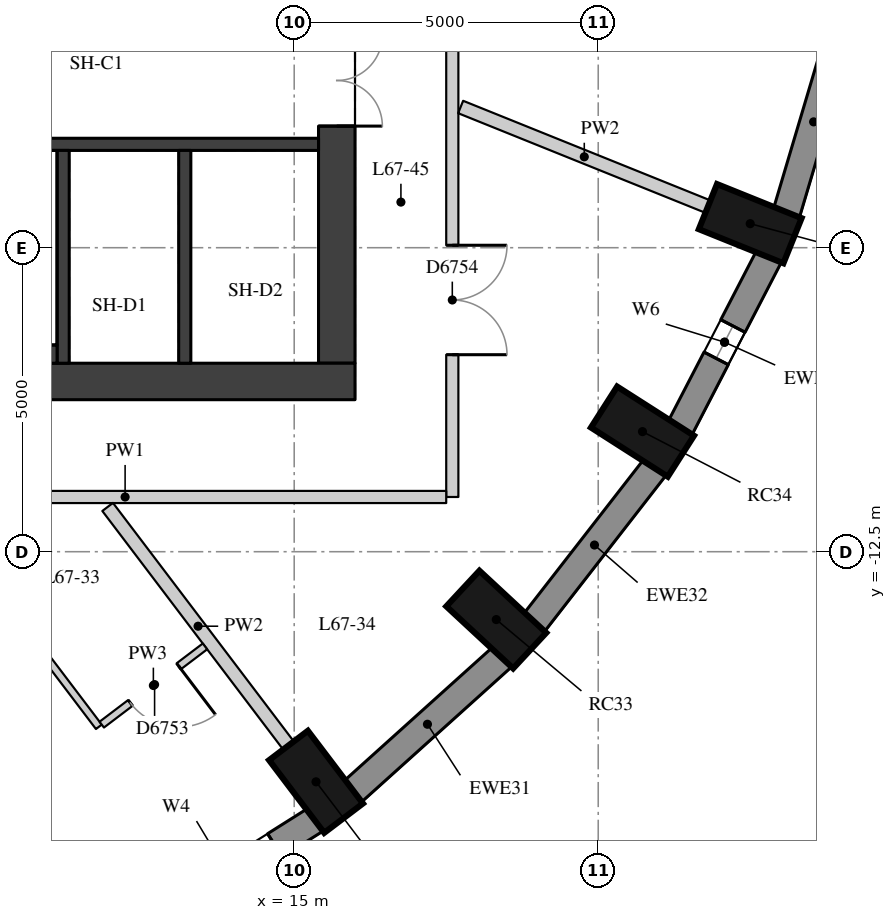
"""IFC4 building model, lengths in metres.
Left out: names, types, materials, properties, quantities, classifications, styles, units other than length and angle.
Written with IfcOpenShell. Run it as: python <this file> out.ifc"""

import sys

from ifc_helpers import new_model, si_unit, direction, frame, frame_2d, origin, origin_2d, place, context, subcontext, project, spatial, rectangle, extrude, element, fill, save


model = new_model("IFC4")
c1 = context("Model", 3, precision=1e-05, world=origin(), true_north=direction((0.0, 1.0)))
c2 = subcontext(c1, "Body", "Model", "MODEL_VIEW")
j1 = project(units=[si_unit("LENGTHUNIT", "METRE"), si_unit("PLANEANGLEUNIT", "RADIAN")], contexts=[c1])
p1 = place(None, origin())
s1 = spatial("IfcSite", under=j1, at=p1, CompositionType="ELEMENT")
p2 = place(p1, origin())
s2 = spatial("IfcBuilding", under=s1, at=p2, CompositionType="ELEMENT")
p3 = place(p2, frame((0.0, 0.0, 236.6)))
s3 = spatial("IfcBuildingStorey", under=s2, at=p3, CompositionType="ELEMENT", Elevation=236.6)
for number, where, z_axis, x_axis in (
    (1, (15.359, -16.285, 0.0), (0.0, 0.0, 1.0), (0.604, -0.797, 0.0)),
    (2, (18.323, -13.616, 0.0), (0.0, 0.0, 1.0), (0.733, -0.681, 0.0)),
    (3, (20.728, -10.525, 0.0), (0.0, 0.0, 1.0), (0.843, -0.539, 0.0)),
    (4, (22.5, -7.105, 0.0), (0.0, 0.0, 1.0), (0.928, -0.374, 0.0)),
):
    element("IfcColumn", number, at=place(p3, frame(where, z_axis=z_axis, x_axis=x_axis)), inside=s3, PredefinedType="COLUMN", context=c2, shape_type="SweptSolid", body=[
        extrude(rectangle(XDim=1.5, YDim=0.8, at=origin_2d()), origin(), (0.0, 0.0, 1.0), 3.3),
    ])
p4 = place(p3, frame((12.49, -18.711, 0.0), z_axis=(0.0, 0.0, 1.0), x_axis=(0.845929139811, 0.53329531258, 0.0)))
e5 = element("IfcWall", 5, at=p4, inside=s3, PredefinedType="SOLIDWALL", context=c2, shape_type="SweptSolid", body=[
    extrude(rectangle(XDim=3.385, YDim=0.45, at=frame_2d((1.692, 0.0))), origin(), (0.0, 0.0, 1.0), 3.02),
])
p5 = place(p4, frame((0.792, 0.0, 0.4)))
e6 = element("IfcOpeningElement", 6, at=p5, cuts=e5, PredefinedType="OPENING", context=c2, shape_type="SweptSolid", body=[
    extrude(rectangle(XDim=1.8, YDim=1.75, at=frame_2d((0.9, 0.875))), frame((0.0, 0.235, 0.0), z_axis=(0.0, -1.0, 0.0), x_axis=(1.0, 0.0, 0.0)), (0.0, 0.0, 1.0), 0.47),
])
p6 = place(p3, frame((15.959, -16.448, 0.0), z_axis=(0.0, 0.0, 1.0), x_axis=(0.743166014219, 0.669107073128, 0.0)))
e7 = element("IfcWall", 7, at=p6, inside=s3, PredefinedType="SOLIDWALL", context=c2, shape_type="SweptSolid", body=[
    extrude(rectangle(XDim=3.316, YDim=0.45, at=frame_2d((1.658, 0.0))), origin(), (0.0, 0.0, 1.0), 3.02),
])
p7 = place(p3, frame((18.942, -13.672, 0.0), z_axis=(0.0, 0.0, 1.0), x_axis=(0.613898970825, 0.789384604372, 0.0)))
e8 = element("IfcWall", 8, at=p7, inside=s3, PredefinedType="SOLIDWALL", context=c2, shape_type="SweptSolid", body=[
    extrude(rectangle(XDim=3.247, YDim=0.45, at=frame_2d((1.624, 0.0))), origin(), (0.0, 0.0, 1.0), 3.02),
])
p8 = place(p3, frame((21.345, -10.468, 0.0), z_axis=(0.0, 0.0, 1.0), x_axis=(0.459921155255, 0.887959757505, 0.0)))
e9 = element("IfcWall", 9, at=p8, inside=s3, PredefinedType="SOLIDWALL", context=c2, shape_type="SweptSolid", body=[
    extrude(rectangle(XDim=3.186, YDim=0.45, at=frame_2d((1.593, 0.0))), origin(), (0.0, 0.0, 1.0), 3.02),
])
p9 = place(p8, frame((1.293, 0.0, 0.4)))
e10 = element("IfcOpeningElement", 10, at=p9, cuts=e9, PredefinedType="OPENING", context=c2, shape_type="SweptSolid", body=[
    extrude(rectangle(XDim=0.6, YDim=1.75, at=frame_2d((0.3, 0.875))), frame((0.0, 0.235, 0.0), z_axis=(0.0, -1.0, 0.0), x_axis=(1.0, 0.0, 0.0)), (0.0, 0.0, 1.0), 0.47),
])
p10 = place(p3, frame((23.094, -6.935, 0.0), z_axis=(0.0, 0.0, 1.0), x_axis=(0.285263800865, 0.958449040855, 0.0)))
e11 = element("IfcWall", 11, at=p10, inside=s3, PredefinedType="SOLIDWALL", context=c2, shape_type="SweptSolid", body=[
    extrude(rectangle(XDim=3.139, YDim=0.45, at=frame_2d((1.57, 0.0))), origin(), (0.0, 0.0, 1.0), 3.02),
])
p11 = place(p3, frame((15.7, -9.4, 0.0), z_axis=(0.0, 0.0, 1.0), x_axis=(0.0, 1.0, 0.0)))
e12 = element("IfcWall", 12, at=p11, inside=s3, PredefinedType="SHEAR", context=c2, shape_type="SweptSolid", body=[
    extrude(rectangle(XDim=18.8, YDim=0.6, at=frame_2d((9.4, 0.0))), origin(), (0.0, 0.0, 1.0), 3.02),
])
p12 = place(p11, frame((13.4, 0.0, 0.0)))
e13 = element("IfcOpeningElement", 13, at=p12, cuts=e12, PredefinedType="OPENING", context=c2, shape_type="SweptSolid", body=[
    extrude(rectangle(XDim=1.5, YDim=2.1, at=frame_2d((0.75, 1.05))), frame((0.0, 0.31, 0.0), z_axis=(0.0, -1.0, 0.0), x_axis=(1.0, 0.0, 0.0)), (0.0, 0.0, 1.0), 0.62),
])
p13 = place(p11, frame((3.9, 0.0, 0.0)))
e14 = element("IfcOpeningElement", 14, at=p13, cuts=e12, PredefinedType="OPENING", context=c2, shape_type="SweptSolid", body=[
    extrude(rectangle(XDim=1.5, YDim=2.1, at=frame_2d((0.75, 1.05))), frame((0.0, 0.31, 0.0), z_axis=(0.0, -1.0, 0.0), x_axis=(1.0, 0.0, 0.0)), (0.0, 0.0, 1.0), 0.62),
])
p14 = place(p3, frame((4.0, -9.7, 0.0), z_axis=(0.0, 0.0, 1.0), x_axis=(1.0, 0.0, 0.0)))
e15 = element("IfcWall", 15, at=p14, inside=s3, PredefinedType="SHEAR", context=c2, shape_type="SweptSolid", body=[
    extrude(rectangle(XDim=12.0, YDim=0.6, at=frame_2d((6.0, 0.0))), origin(), (0.0, 0.0, 1.0), 3.02),
])
p15 = place(p3, frame((4.6, -5.8, 0.0), z_axis=(0.0, 0.0, 1.0), x_axis=(1.0, 0.0, 0.0)))
e16 = element("IfcWall", 16, at=p15, inside=s3, PredefinedType="SHEAR", context=c2, shape_type="SweptSolid", body=[
    extrude(rectangle(XDim=10.8, YDim=0.2, at=frame_2d((5.4, 0.0))), origin(), (0.0, 0.0, 1.0), 3.02),
])
for number, where, z_axis, x_axis in (
    (17, (11.2, -9.4, 0.0), (0.0, 0.0, 1.0), (0.0, 1.0, 0.0)),
    (18, (13.2, -9.4, 0.0), (0.0, 0.0, 1.0), (0.0, 1.0, 0.0)),
):
    element("IfcWall", number, at=place(p3, frame(where, z_axis=z_axis, x_axis=x_axis)), inside=s3, PredefinedType="SHEAR", context=c2, shape_type="SweptSolid", body=[
        extrude(rectangle(XDim=3.5, YDim=0.2, at=frame_2d((1.75, 0.0))), origin(), (0.0, 0.0, 1.0), 3.02),
    ])
p16 = place(p3, frame((6.22, -9.25, 0.0), z_axis=(0.0, 0.0, 1.0), x_axis=(1.0, 0.0, 0.0)))
e19 = element("IfcWall", 19, at=p16, inside=s3, PredefinedType="PARTITIONING", context=c2, shape_type="SweptSolid", body=[
    extrude(rectangle(XDim=4.88, YDim=0.3, at=frame_2d((2.44, 0.0))), origin(), (0.0, 0.0, 1.0), 3.02),
])
p17 = place(p3, frame((17.6, 11.5, 0.0), z_axis=(0.0, 0.0, 1.0), x_axis=(0.0, -1.0, 0.0)))
e20 = element("IfcWall", 20, at=p17, inside=s3, PredefinedType="PARTITIONING", context=c2, shape_type="SweptSolid", body=[
    extrude(rectangle(XDim=23.1, YDim=0.2, at=frame_2d((11.55, 0.0))), origin(), (0.0, 0.0, 1.0), 3.02),
])
p18 = place(p17, frame((18.96, 0.0, 0.0)))
e21 = element("IfcOpeningElement", 21, at=p18, cuts=e20, PredefinedType="OPENING", context=c2, shape_type="SweptSolid", body=[
    extrude(rectangle(XDim=1.8, YDim=2.1, at=frame_2d((0.9, 1.05))), frame((0.0, 0.11, 0.0), z_axis=(0.0, -1.0, 0.0), x_axis=(1.0, 0.0, 0.0)), (0.0, 0.0, 1.0), 0.22),
])
p19 = place(p17, frame((11.617, 0.0, 0.0)))
e22 = element("IfcOpeningElement", 22, at=p19, cuts=e20, PredefinedType="OPENING", context=c2, shape_type="SweptSolid", body=[
    extrude(rectangle(XDim=1.8, YDim=2.1, at=frame_2d((0.9, 1.05))), frame((0.0, 0.11, 0.0), z_axis=(0.0, -1.0, 0.0), x_axis=(1.0, 0.0, 0.0)), (0.0, 0.0, 1.0), 0.22),
])
p20 = place(p17, frame((4.591, 0.0, 0.0)))
e23 = element("IfcOpeningElement", 23, at=p20, cuts=e20, PredefinedType="OPENING", context=c2, shape_type="SweptSolid", body=[
    extrude(rectangle(XDim=1.8, YDim=2.1, at=frame_2d((0.9, 1.05))), frame((0.0, 0.11, 0.0), z_axis=(0.0, -1.0, 0.0), x_axis=(1.0, 0.0, 0.0)), (0.0, 0.0, 1.0), 0.22),
])
p21 = place(p3, frame((17.5, -11.6, 0.0), z_axis=(0.0, 0.0, 1.0), x_axis=(-1.0, 0.0, 0.0)))
e24 = element("IfcWall", 24, at=p21, inside=s3, PredefinedType="PARTITIONING", context=c2, shape_type="SweptSolid", body=[
    extrude(rectangle(XDim=10.562, YDim=0.2, at=frame_2d((5.281, 0.0))), origin(), (0.0, 0.0, 1.0), 3.02),
])
p22 = place(p3, frame((14.906, -15.687, 0.0), z_axis=(0.0, 0.0, 1.0), x_axis=(-0.604078206052, 0.796925041, 0.0)))
e25 = element("IfcWall", 25, at=p22, inside=s3, PredefinedType="PARTITIONING", context=c2, shape_type="SweptSolid", body=[
    extrude(rectangle(XDim=4.923, YDim=0.22, at=frame_2d((2.462, 0.0))), origin(), (0.0, 0.0, 1.0), 3.02),
])
p23 = place(p3, frame((21.804, -6.824, 0.0), z_axis=(0.0, 0.0, 1.0), x_axis=(-0.927528978592, 0.373751245981, 0.0)))
e26 = element("IfcWall", 26, at=p23, inside=s3, PredefinedType="PARTITIONING", context=c2, shape_type="SweptSolid", body=[
    extrude(rectangle(XDim=4.384, YDim=0.22, at=frame_2d((2.192, 0.0))), origin(), (0.0, 0.0, 1.0), 3.02),
])
p24 = place(p3, frame((9.022, -11.732, 0.0), z_axis=(0.0, 0.0, 1.0), x_axis=(0.604079451594, -0.796924096863, 0.0)))
e27 = element("IfcWall", 27, at=p24, inside=s3, PredefinedType="PARTITIONING", context=c2, shape_type="SweptSolid", body=[
    extrude(rectangle(XDim=4.578, YDim=0.12, at=frame_2d((2.289, 0.0))), origin(), (0.0, 0.0, 1.0), 3.02),
])
p25 = place(p3, frame((11.835, -15.344, 0.0), z_axis=(0.0, 0.0, 1.0), x_axis=(0.79693666797, 0.604062866964, 0.0)))
e28 = element("IfcWall", 28, at=p25, inside=s3, PredefinedType="PARTITIONING", context=c2, shape_type="SweptSolid", body=[
    extrude(rectangle(XDim=2.13, YDim=0.12, at=frame_2d((1.065, 0.0))), origin(), (0.0, 0.0, 1.0), 3.02),
])
p26 = place(p25, frame((0.59, 0.0, 0.0)))
e29 = element("IfcOpeningElement", 29, at=p26, cuts=e28, PredefinedType="OPENING", context=c2, shape_type="SweptSolid", body=[
    extrude(rectangle(XDim=1.0, YDim=2.1, at=frame_2d((0.5, 1.05))), frame((0.0, 0.07, 0.0), z_axis=(0.0, -1.0, 0.0), x_axis=(1.0, 0.0, 0.0)), (0.0, 0.0, 1.0), 0.14),
])
p27 = place(p9, origin())
e30 = element("IfcWindow", 30, at=p27, inside=s3, PartitioningType="SINGLE_PANEL", PredefinedType="WINDOW", context=c2, shape_type="SweptSolid", body=[
    extrude(rectangle(XDim=0.6, YDim=1.75, at=frame_2d((0.3, 0.875))), frame((0.0, 0.035, 0.0), z_axis=(0.0, -1.0, 0.0), x_axis=(1.0, 0.0, 0.0)), (0.0, 0.0, 1.0), 0.06),
])
fill(e10, e30)
p28 = place(p13, origin())
e31 = element("IfcDoor", 31, at=p28, inside=s3, OperationType="DOUBLE_DOOR_SINGLE_SWING", PredefinedType="DOOR", context=c2, shape_type="SweptSolid", body=[
    extrude(rectangle(XDim=1.5, YDim=2.1, at=frame_2d((0.75, 1.05))), frame((0.0, 0.025, 0.0), z_axis=(0.0, -1.0, 0.0), x_axis=(1.0, 0.0, 0.0)), (0.0, 0.0, 1.0), 0.05),
])
fill(e14, e31)
p29 = place(p26, origin())
e32 = element("IfcDoor", 32, at=p29, inside=s3, OperationType="SINGLE_SWING_LEFT", PredefinedType="DOOR", context=c2, shape_type="SweptSolid", body=[
    extrude(rectangle(XDim=1.0, YDim=2.1, at=frame_2d((0.5, 1.05))), frame((0.0, 0.025, 0.0), z_axis=(0.0, -1.0, 0.0), x_axis=(1.0, 0.0, 0.0)), (0.0, 0.0, 1.0), 0.05),
])
fill(e29, e32)
p30 = place(p18, origin())
e33 = element("IfcDoor", 33, at=p30, inside=s3, OperationType="DOUBLE_DOOR_SINGLE_SWING", PredefinedType="DOOR", context=c2, shape_type="SweptSolid", body=[
    extrude(rectangle(XDim=1.8, YDim=2.1, at=frame_2d((0.9, 1.05))), frame((0.0, 0.025, 0.0), z_axis=(0.0, -1.0, 0.0), x_axis=(1.0, 0.0, 0.0)), (0.0, 0.0, 1.0), 0.05),
])
fill(e21, e33)
save(model, sys.argv[1])
